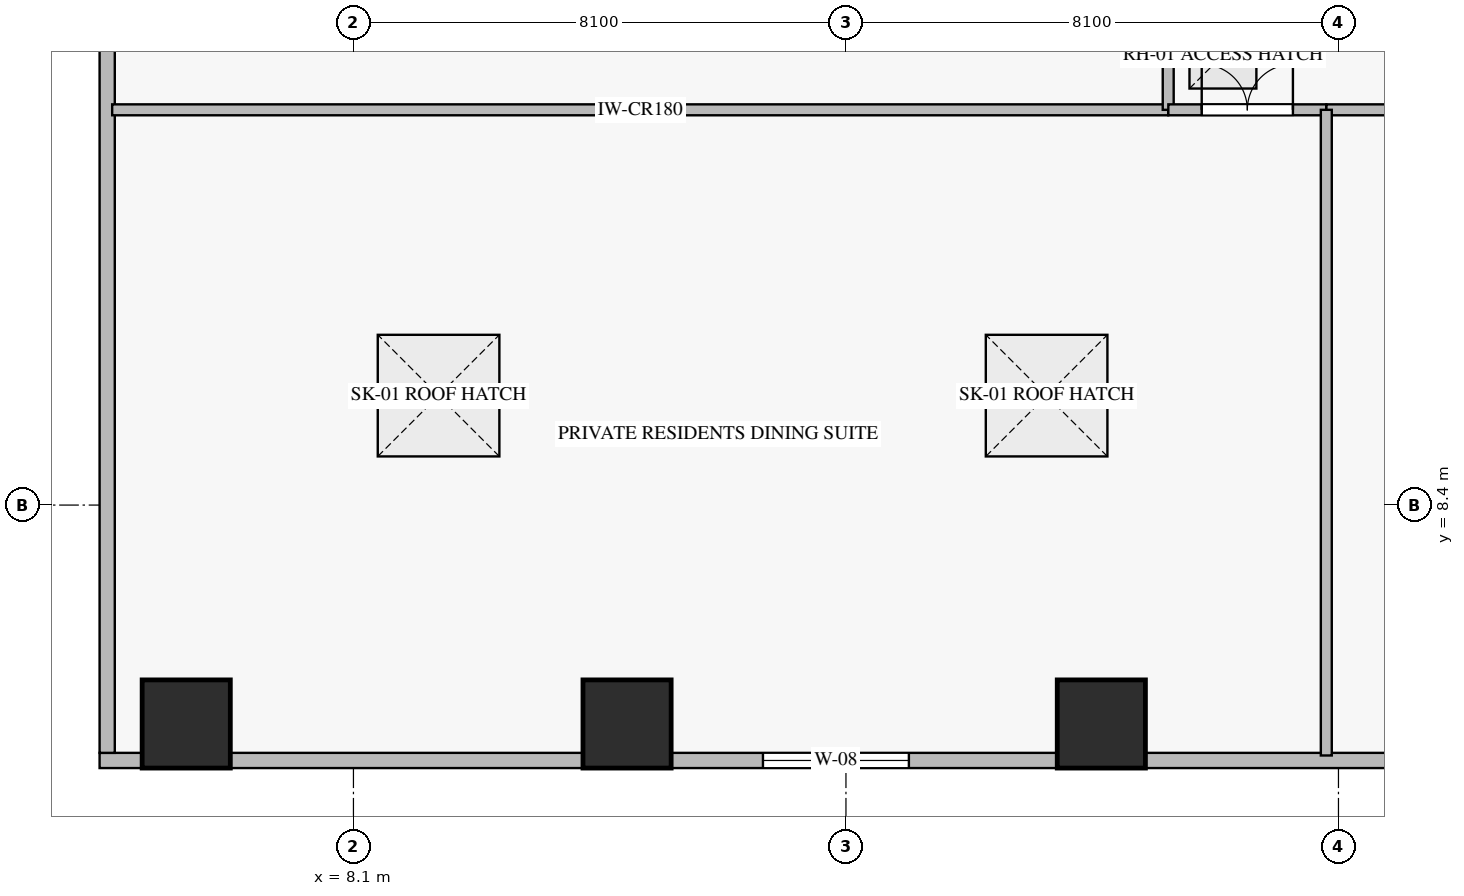
"""IFC4 building model, lengths in metres.
Left out: names, types, materials, properties, quantities, classifications, styles, units other than length and angle.
Written with IfcOpenShell. Run it as: python <this file> out.ifc"""

import sys

from ifc_helpers import new_model, si_unit, direction, frame, frame_2d, origin, origin_2d, place, context, subcontext, project, spatial, rectangle, extrude, source, transform, mapped, element, fill, save


model = new_model("IFC4")
c1 = context("Model", 3, precision=1e-05, world=origin(), true_north=direction((0.0, 1.0)))
c2 = subcontext(c1, "Body", "Model", "MODEL_VIEW")
j1 = project(units=[si_unit("LENGTHUNIT", "METRE"), si_unit("PLANEANGLEUNIT", "RADIAN")], contexts=[c1])
p1 = place(None, origin())
s1 = spatial("IfcSite", under=j1, at=p1, CompositionType="ELEMENT")
p2 = place(p1, origin())
s2 = spatial("IfcBuilding", under=s1, at=p2, CompositionType="ELEMENT")
p3 = place(p2, frame((0.0, 0.0, 15.3)))
s3 = spatial("IfcBuildingStorey", under=s2, at=p3, CompositionType="ELEMENT", Elevation=15.3)
m1 = source(origin(), c2, "Body", "SweptSolid", [
    extrude(rectangle(XDim=1.45, YDim=1.45, at=origin_2d()), origin(), (0.0, 0.0, 1.0), 5.23),
])
for number, where, z_axis, x_axis in (
    (1, (12.6, 4.8, -0.38), (0.0, 0.0, 1.0), (1.0, 0.0, 0.0)),
    (2, (20.4, 4.8, -0.38), (0.0, 0.0, 1.0), (1.0, 0.0, 0.0)),
    (3, (5.35, 4.8, -0.38), (0.0, 0.0, 1.0), (1.0, 0.0, 0.0)),
):
    element("IfcColumn", number, at=place(p3, frame(where, z_axis=z_axis, x_axis=x_axis)), inside=s3, PredefinedType="COLUMN", context=c2, shape_type="MappedRepresentation", body=[
        mapped(m1, transform((0.0, 0.0, 0.0), scale=1.0)),
    ])
p4 = place(p3, frame((3.925, 4.2, 0.0), z_axis=(0.0, 0.0, 1.0), x_axis=(1.0, 0.0, 0.0)))
e4 = element("IfcWall", 4, at=p4, inside=s3, PredefinedType="ELEMENTEDWALL", context=c2, shape_type="SweptSolid", body=[
    extrude(rectangle(XDim=56.95, YDim=0.25, at=frame_2d((28.475, 0.0))), origin(), (0.0, 0.0, 1.0), 4.835),
])
p5 = place(p4, frame((10.91, 0.0, 0.6)))
e5 = element("IfcOpeningElement", 5, at=p5, cuts=e4, PredefinedType="OPENING", context=c2, shape_type="SweptSolid", body=[
    extrude(rectangle(XDim=2.4, YDim=2.6, at=frame_2d((1.2, 1.3))), frame((0.0, 0.135, 0.0), z_axis=(0.0, -1.0, 0.0), x_axis=(1.0, 0.0, 0.0)), (0.0, 0.0, 1.0), 0.27),
])
p6 = place(p4, frame((43.64, 0.0, 0.6)))
e6 = element("IfcOpeningElement", 6, at=p6, cuts=e4, PredefinedType="OPENING", context=c2, shape_type="SweptSolid", body=[
    extrude(rectangle(XDim=2.4, YDim=2.6, at=frame_2d((1.2, 1.3))), frame((0.0, 0.135, 0.0), z_axis=(0.0, -1.0, 0.0), x_axis=(1.0, 0.0, 0.0)), (0.0, 0.0, 1.0), 0.27),
])
p7 = place(p3, frame((4.05, 46.075, 0.0), z_axis=(0.0, 0.0, 1.0), x_axis=(0.0, -1.0, 0.0)))
e7 = element("IfcWall", 7, at=p7, inside=s3, PredefinedType="ELEMENTEDWALL", context=c2, shape_type="SweptSolid", body=[
    extrude(rectangle(XDim=41.75, YDim=0.25, at=frame_2d((20.875, 0.0))), origin(), (0.0, 0.0, 1.0), 4.835),
])
p8 = place(p7, frame((7.87, 0.0, 0.6)))
e8 = element("IfcOpeningElement", 8, at=p8, cuts=e7, PredefinedType="OPENING", context=c2, shape_type="SweptSolid", body=[
    extrude(rectangle(XDim=2.4, YDim=2.6, at=frame_2d((1.2, 1.3))), frame((0.0, 0.135, 0.0), z_axis=(0.0, -1.0, 0.0), x_axis=(1.0, 0.0, 0.0)), (0.0, 0.0, 1.0), 0.27),
])
p9 = place(p7, frame((24.397, 0.0, 0.6)))
e9 = element("IfcOpeningElement", 9, at=p9, cuts=e7, PredefinedType="OPENING", context=c2, shape_type="SweptSolid", body=[
    extrude(rectangle(XDim=2.4, YDim=2.6, at=frame_2d((1.2, 1.3))), frame((0.0, 0.135, 0.0), z_axis=(0.0, -1.0, 0.0), x_axis=(1.0, 0.0, 0.0)), (0.0, 0.0, 1.0), 0.27),
])
p10 = place(p3, frame((4.132, 14.9, 0.0), z_axis=(0.0, 0.0, 1.0), x_axis=(1.0, 0.0, 0.0)))
e10 = element("IfcWall", 10, at=p10, inside=s3, PredefinedType="PARTITIONING", context=c2, shape_type="SweptSolid", body=[
    extrude(rectangle(XDim=17.368, YDim=0.18, at=frame_2d((8.684, 0.0))), origin(), (0.0, 0.0, 1.0), 4.85),
])
p11 = place(p3, frame((21.5, 14.9, 0.0), z_axis=(0.0, 0.0, 1.0), x_axis=(0.0, 1.0, 0.0)))
e11 = element("IfcWall", 11, at=p11, inside=s3, PredefinedType="PARTITIONING", context=c2, shape_type="SweptSolid", body=[
    extrude(rectangle(XDim=18.18, YDim=0.18, at=frame_2d((9.09, 0.0))), origin(), (0.0, 0.0, 1.0), 4.85),
])
p12 = place(p11, frame((8.34, 0.0, 0.0)))
e12 = element("IfcOpeningElement", 12, at=p12, cuts=e11, PredefinedType="OPENING", context=c2, shape_type="SweptSolid", body=[
    extrude(rectangle(XDim=1.5, YDim=2.25, at=frame_2d((0.75, 1.125))), frame((0.0, 0.1, 0.0), z_axis=(0.0, -1.0, 0.0), x_axis=(1.0, 0.0, 0.0)), (0.0, 0.0, 1.0), 0.2),
])
p13 = place(p3, frame((21.502, 14.9, 0.0), z_axis=(0.0, 0.0, 1.0), x_axis=(1.0, 0.0, 0.0)))
e13 = element("IfcWall", 13, at=p13, inside=s3, PredefinedType="PARTITIONING", context=c2, shape_type="SweptSolid", body=[
    extrude(rectangle(XDim=2.598, YDim=0.18, at=frame_2d((1.299, 0.0))), origin(), (0.0, 0.0, 1.0), 4.85),
])
p14 = place(p13, frame((0.549, 0.0, 0.0)))
e14 = element("IfcOpeningElement", 14, at=p14, cuts=e13, PredefinedType="OPENING", context=c2, shape_type="SweptSolid", body=[
    extrude(rectangle(XDim=1.5, YDim=2.25, at=frame_2d((0.75, 1.125))), frame((0.0, 0.1, 0.0), z_axis=(0.0, -1.0, 0.0), x_axis=(1.0, 0.0, 0.0)), (0.0, 0.0, 1.0), 0.2),
])
p15 = place(p3, frame((24.102, 14.9, 0.0), z_axis=(0.0, 0.0, 1.0), x_axis=(1.0, 0.0, 0.0)))
e15 = element("IfcWall", 15, at=p15, inside=s3, PredefinedType="PARTITIONING", context=c2, shape_type="SweptSolid", body=[
    extrude(rectangle(XDim=11.098, YDim=0.18, at=frame_2d((5.549, 0.0))), origin(), (0.0, 0.0, 1.0), 4.85),
])
p16 = place(p15, frame((4.749, 0.0, 0.0)))
e16 = element("IfcOpeningElement", 16, at=p16, cuts=e15, PredefinedType="OPENING", context=c2, shape_type="SweptSolid", body=[
    extrude(rectangle(XDim=1.6, YDim=2.3, at=frame_2d((0.8, 1.15))), frame((0.0, 0.1, 0.0), z_axis=(0.0, -1.0, 0.0), x_axis=(1.0, 0.0, 0.0)), (0.0, 0.0, 1.0), 0.2),
])
p17 = place(p3, frame((24.1, 4.282, 0.0), z_axis=(0.0, 0.0, 1.0), x_axis=(0.0, 1.0, 0.0)))
e17 = element("IfcWall", 17, at=p17, inside=s3, PredefinedType="PARTITIONING", context=c2, shape_type="SweptSolid", body=[
    extrude(rectangle(XDim=10.618, YDim=0.18, at=frame_2d((5.309, 0.0))), origin(), (0.0, 0.0, 1.0), 4.85),
])
m2 = source(origin(), c2, "Body", "SweptSolid", [
    extrude(rectangle(XDim=2.4, YDim=2.6, at=frame_2d((1.2, 1.3))), frame((0.0, 0.03, 0.0), z_axis=(0.0, -1.0, 0.0), x_axis=(1.0, 0.0, 0.0)), (0.0, 0.0, 1.0), 0.06),
])
p18 = place(p5, origin())
e18 = element("IfcWindow", 18, at=p18, inside=s3, PartitioningType="SINGLE_PANEL", PredefinedType="WINDOW", context=c2, shape_type="MappedRepresentation", body=[
    mapped(m2, transform((0.0, 0.0, 0.0), scale=1.0)),
])
fill(e5, e18)
p19 = place(p3, frame((0.0, 0.0, -0.38)))
p20 = place(p19, frame((9.5, 10.2, 0.0)))
p21 = place(p20, frame((0.0, 0.0, 0.34)))
e19 = element("IfcWindow", 19, at=p21, inside=s3, PartitioningType="SINGLE_PANEL", PredefinedType="SKYLIGHT", context=c2, shape_type="SweptSolid", body=[
    extrude(rectangle(XDim=2.0, YDim=2.0, at=origin_2d()), origin(), (0.0, 0.0, 1.0), 0.04),
])
p22 = place(p19, frame((19.5, 10.2, 0.0)))
p23 = place(p22, frame((0.0, 0.0, 0.34)))
e20 = element("IfcWindow", 20, at=p23, inside=s3, PartitioningType="SINGLE_PANEL", PredefinedType="SKYLIGHT", context=c2, shape_type="SweptSolid", body=[
    extrude(rectangle(XDim=2.0, YDim=2.0, at=origin_2d()), origin(), (0.0, 0.0, 1.0), 0.04),
])
p24 = place(p2, frame((0.0, 0.0, 21.0)))
p25 = place(p24, frame((0.0, 0.0, -0.85)))
p26 = place(p25, frame((22.4, 15.8, 0.0)))
p27 = place(p26, frame((0.0, 0.0, 0.81)))
e21 = element("IfcDoor", 21, at=p27, inside=s3, OperationType="SINGLE_SWING_LEFT", PredefinedType="TRAPDOOR", context=c2, shape_type="SweptSolid", body=[
    extrude(rectangle(XDim=1.1, YDim=1.1, at=origin_2d()), origin(), (0.0, 0.0, 1.0), 0.04),
])
m3 = source(origin(), c2, "Body", "SweptSolid", [
    extrude(rectangle(XDim=1.5, YDim=2.25, at=frame_2d((0.75, 1.125))), frame((0.0, 0.025, 0.0), z_axis=(0.0, -1.0, 0.0), x_axis=(1.0, 0.0, 0.0)), (0.0, 0.0, 1.0), 0.05),
])
p28 = place(p14, origin())
e22 = element("IfcDoor", 22, at=p28, inside=s3, OperationType="DOUBLE_DOOR_SINGLE_SWING", PredefinedType="DOOR", context=c2, shape_type="MappedRepresentation", body=[
    mapped(m3, transform((0.0, 0.0, 0.0), scale=1.0)),
])
fill(e14, e22)
save(model, sys.argv[1])
